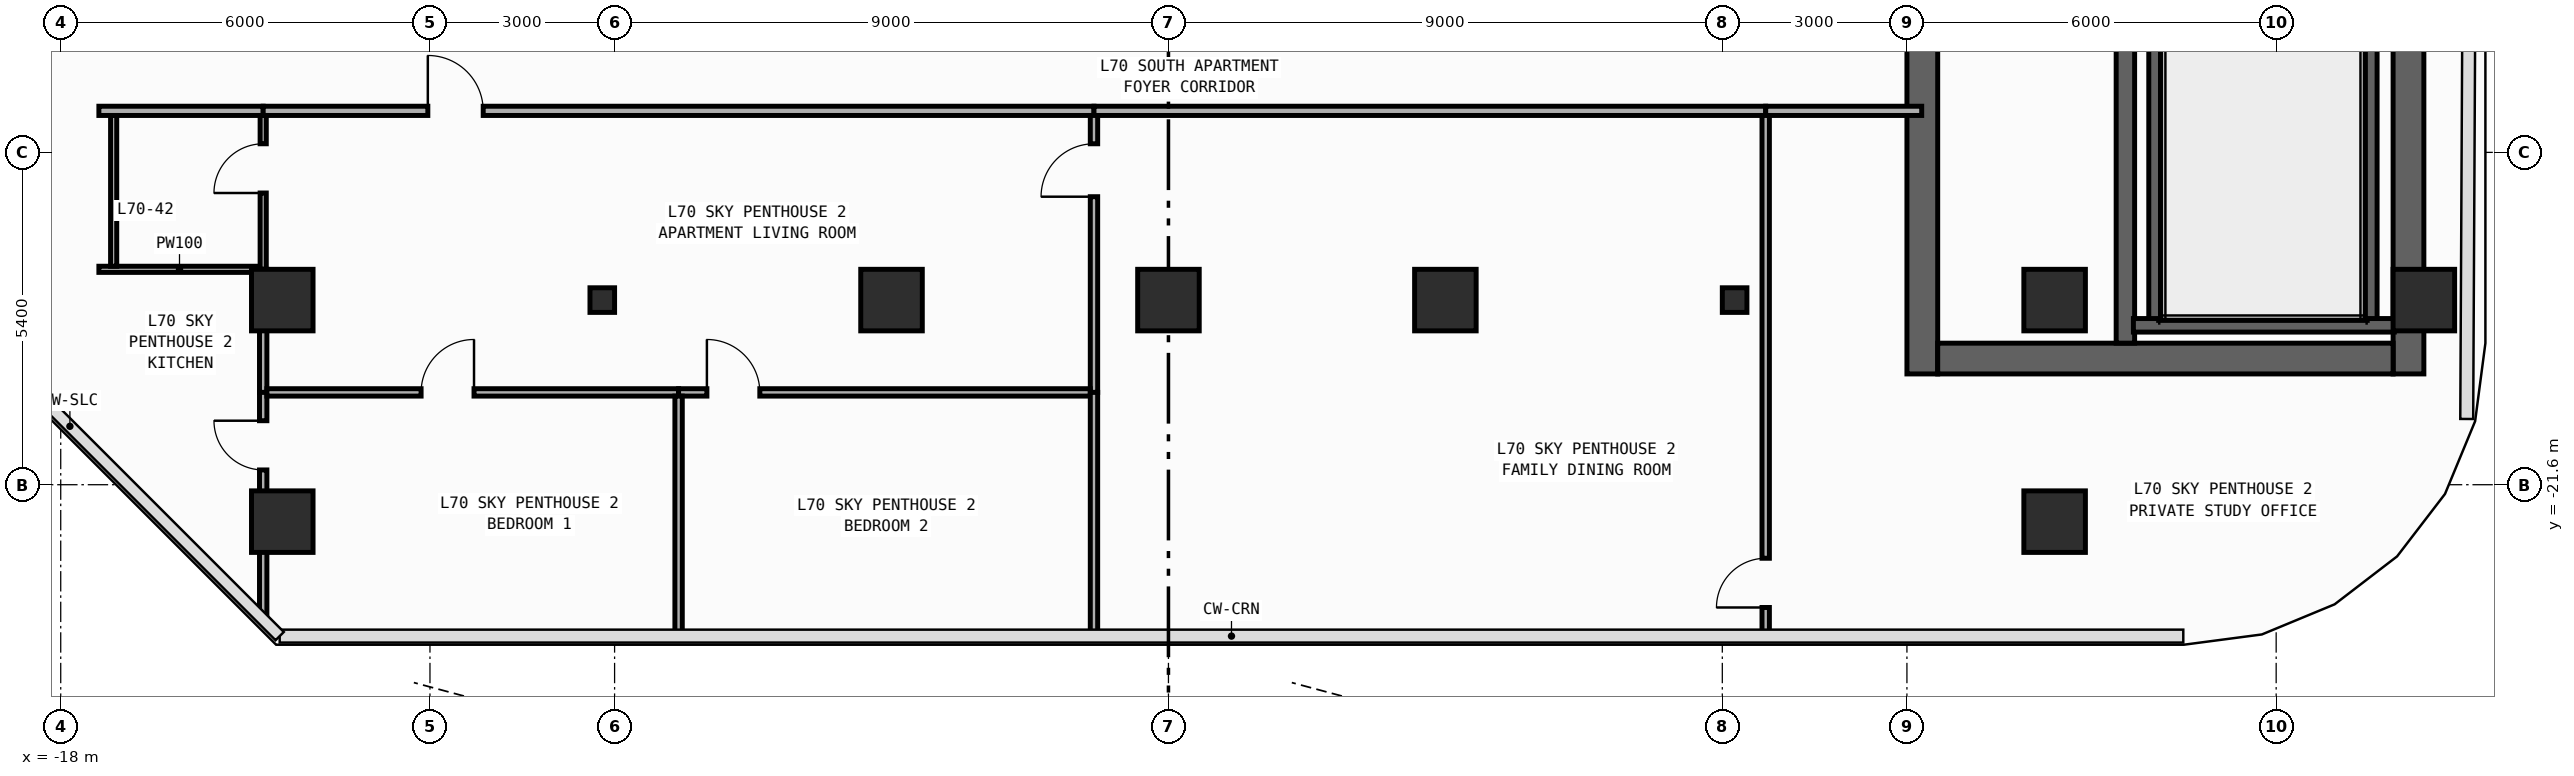
"""IFC4 building model, lengths in metres.
Left out: names, types, materials, properties, quantities, classifications, styles, units other than length and angle.
Written with IfcOpenShell. Run it as: python <this file> out.ifc"""

import sys

from ifc_helpers import new_model, si_unit, direction, frame, frame_2d, origin, origin_2d, place, context, subcontext, project, spatial, rectangle, circle, i_section, extrude, element, fill, save


model = new_model("IFC4")
c1 = context("Model", 3, precision=1e-05, world=origin(), true_north=direction((0.0, 1.0)))
c2 = subcontext(c1, "Body", "Model", "MODEL_VIEW")
j1 = project(units=[si_unit("LENGTHUNIT", "METRE"), si_unit("PLANEANGLEUNIT", "RADIAN")], contexts=[c1])
p1 = place(None, origin())
s1 = spatial("IfcSite", under=j1, at=p1, CompositionType="ELEMENT")
p2 = place(p1, origin())
s2 = spatial("IfcBuilding", under=s1, at=p2, CompositionType="ELEMENT")
p3 = place(p2, frame((0.0, 0.0, 292.8)))
s3 = spatial("IfcBuildingStorey", under=s2, at=p3, CompositionType="ELEMENT", Elevation=292.8)
p4 = place(p3, frame((12.25, -19.8, 0.0), z_axis=(0.0, 0.0, 1.0), x_axis=(0.0, 1.0, 0.0)))
e1 = element("IfcWall", 1, at=p4, inside=s3, PredefinedType="SHEAR", context=c2, shape_type="SweptSolid", body=[
    extrude(rectangle(XDim=27.0, YDim=0.5, at=frame_2d((13.5, 0.0))), origin(), (0.0, 0.0, 1.0), 3.54),
])
p5 = place(p4, frame((23.05, 0.0, 0.0)))
e2 = element("IfcOpeningElement", 2, at=p5, cuts=e1, PredefinedType="OPENING", context=c2, shape_type="SweptSolid", body=[
    extrude(rectangle(XDim=1.1, YDim=2.2, at=frame_2d((0.55, 1.1))), frame((0.0, 0.26, 0.0), z_axis=(0.0, -1.0, 0.0), x_axis=(1.0, 0.0, 0.0)), (0.0, 0.0, 1.0), 0.52),
])
p6 = place(p4, frame((19.85, 0.0, 0.0)))
e3 = element("IfcOpeningElement", 3, at=p6, cuts=e1, PredefinedType="OPENING", context=c2, shape_type="SweptSolid", body=[
    extrude(rectangle(XDim=1.1, YDim=2.2, at=frame_2d((0.55, 1.1))), frame((0.0, 0.26, 0.0), z_axis=(0.0, -1.0, 0.0), x_axis=(1.0, 0.0, 0.0)), (0.0, 0.0, 1.0), 0.52),
])
p7 = place(p4, frame((16.65, 0.0, 0.0)))
e4 = element("IfcOpeningElement", 4, at=p7, cuts=e1, PredefinedType="OPENING", context=c2, shape_type="SweptSolid", body=[
    extrude(rectangle(XDim=1.1, YDim=2.2, at=frame_2d((0.55, 1.1))), frame((0.0, 0.26, 0.0), z_axis=(0.0, -1.0, 0.0), x_axis=(1.0, 0.0, 0.0)), (0.0, 0.0, 1.0), 0.52),
])
p8 = place(p4, frame((6.275, 0.0, 0.0)))
e5 = element("IfcOpeningElement", 5, at=p8, cuts=e1, PredefinedType="OPENING", context=c2, shape_type="SweptSolid", body=[
    extrude(rectangle(XDim=0.85, YDim=2.1, at=frame_2d((0.425, 1.05))), frame((0.0, 0.26, 0.0), z_axis=(0.0, -1.0, 0.0), x_axis=(1.0, 0.0, 0.0)), (0.0, 0.0, 1.0), 0.52),
])
p9 = place(p4, frame((8.575, 0.0, 0.0)))
e6 = element("IfcOpeningElement", 6, at=p9, cuts=e1, PredefinedType="OPENING", context=c2, shape_type="SweptSolid", body=[
    extrude(rectangle(XDim=0.85, YDim=2.1, at=frame_2d((0.425, 1.05))), frame((0.0, 0.26, 0.0), z_axis=(0.0, -1.0, 0.0), x_axis=(1.0, 0.0, 0.0)), (0.0, 0.0, 1.0), 0.52),
])
p10 = place(p4, frame((10.675, 0.0, 0.0)))
e7 = element("IfcOpeningElement", 7, at=p10, cuts=e1, PredefinedType="OPENING", context=c2, shape_type="SweptSolid", body=[
    extrude(rectangle(XDim=0.85, YDim=2.1, at=frame_2d((0.425, 1.05))), frame((0.0, 0.26, 0.0), z_axis=(0.0, -1.0, 0.0), x_axis=(1.0, 0.0, 0.0)), (0.0, 0.0, 1.0), 0.52),
])
p11 = place(p4, frame((12.725, 0.0, 0.0)))
e8 = element("IfcOpeningElement", 8, at=p11, cuts=e1, PredefinedType="OPENING", context=c2, shape_type="SweptSolid", body=[
    extrude(rectangle(XDim=1.15, YDim=2.2, at=frame_2d((0.575, 1.1))), frame((0.0, 0.26, 0.0), z_axis=(0.0, -1.0, 0.0), x_axis=(1.0, 0.0, 0.0)), (0.0, 0.0, 1.0), 0.52),
])
p12 = place(p4, frame((25.125, 0.0, 0.0)))
e9 = element("IfcOpeningElement", 9, at=p12, cuts=e1, PredefinedType="OPENING", context=c2, shape_type="SweptSolid", body=[
    extrude(rectangle(XDim=0.85, YDim=2.1, at=frame_2d((0.425, 1.05))), frame((0.0, 0.26, 0.0), z_axis=(0.0, -1.0, 0.0), x_axis=(1.0, 0.0, 0.0)), (0.0, 0.0, 1.0), 0.52),
])
p13 = place(p3, frame((20.15, -19.8, 0.0), z_axis=(0.0, 0.0, 1.0), x_axis=(0.0, 1.0, 0.0)))
e10 = element("IfcWall", 10, at=p13, inside=s3, PredefinedType="SHEAR", context=c2, shape_type="SweptSolid", body=[
    extrude(rectangle(XDim=27.0, YDim=0.5, at=frame_2d((13.5, 0.0))), origin(), (0.0, 0.0, 1.0), 3.54),
])
p14 = place(p3, frame((12.5, -19.55, 0.0), z_axis=(0.0, 0.0, 1.0), x_axis=(1.0, 0.0, 0.0)))
e11 = element("IfcWall", 11, at=p14, inside=s3, PredefinedType="SHEAR", context=c2, shape_type="SweptSolid", body=[
    extrude(rectangle(XDim=7.4, YDim=0.5, at=frame_2d((3.7, 0.0))), origin(), (0.0, 0.0, 1.0), 3.54),
])
p15 = place(p3, frame((15.55, -19.3, 0.0), z_axis=(0.0, 0.0, 1.0), x_axis=(0.0, 1.0, 0.0)))
e12 = element("IfcWall", 12, at=p15, inside=s3, PredefinedType="SHEAR", context=c2, shape_type="SweptSolid", body=[
    extrude(rectangle(XDim=26.0, YDim=0.3, at=frame_2d((13.0, 0.0))), origin(), (0.0, 0.0, 1.0), 3.54),
])
p16 = place(p15, frame((12.225, 0.0, 0.0)))
e13 = element("IfcOpeningElement", 13, at=p16, cuts=e12, PredefinedType="OPENING", context=c2, shape_type="SweptSolid", body=[
    extrude(rectangle(XDim=1.15, YDim=2.2, at=frame_2d((0.575, 1.1))), frame((0.0, 0.16, 0.0), z_axis=(0.0, -1.0, 0.0), x_axis=(1.0, 0.0, 0.0)), (0.0, 0.0, 1.0), 0.32),
])
p17 = place(p15, frame((24.625, 0.0, 0.0)))
e14 = element("IfcOpeningElement", 14, at=p17, cuts=e12, PredefinedType="OPENING", context=c2, shape_type="SweptSolid", body=[
    extrude(rectangle(XDim=0.85, YDim=2.1, at=frame_2d((0.425, 1.05))), frame((0.0, 0.16, 0.0), z_axis=(0.0, -1.0, 0.0), x_axis=(1.0, 0.0, 0.0)), (0.0, 0.0, 1.0), 0.32),
])
for number, where, z_axis, x_axis in (
    (15, (16.04, -19.01, 0.0), (0.0, 0.0, 1.0), (0.0, 1.0, 0.0)),
    (16, (19.53, -19.01, 0.0), (0.0, 0.0, 1.0), (0.0, 1.0, 0.0)),
):
    element("IfcWall", number, at=place(p3, frame(where, z_axis=z_axis, x_axis=x_axis)), inside=s3, PredefinedType="SHEAR", context=c2, shape_type="SweptSolid", body=[
        extrude(rectangle(XDim=11.42, YDim=0.22, at=frame_2d((5.71, 0.0))), origin(), (0.0, 0.0, 1.0), 3.54),
    ])
p18 = place(p3, frame((15.68, -19.01, 0.0), z_axis=(0.0, 0.0, 1.0), x_axis=(1.0, 0.0, 0.0)))
e17 = element("IfcWall", 17, at=p18, inside=s3, PredefinedType="SHEAR", context=c2, shape_type="SweptSolid", body=[
    extrude(rectangle(XDim=4.24, YDim=0.22, at=frame_2d((2.12, 0.0))), origin(), (0.0, 0.0, 1.0), 3.54),
])
for number, where, z_axis, x_axis in (
    (18, (-9.2, -18.6, 0.0), (0.0, 0.0, 1.0), (1.0, 0.0, 0.0)),
    (19, (9.2, -18.6, 0.0), (0.0, 0.0, 1.0), (1.0, 0.0, 0.0)),
):
    element("IfcColumn", number, at=place(p3, frame(where, z_axis=z_axis, x_axis=x_axis)), inside=s3, PredefinedType="COLUMN", context=c2, shape_type="SweptSolid", body=[
        extrude(i_section(OverallWidth=0.4, OverallDepth=0.4, WebThickness=0.013, FlangeThickness=0.021, FilletRadius=0.022, at=origin_2d()), origin(), (0.0, 0.0, 1.0), 3.8),
    ])
for number, where, z_axis, x_axis in (
    (20, (20.4, -18.6, 0.0), (0.0, 0.0, 1.0), (1.0, 0.0, 0.0)),
    (21, (-14.4, -18.6, 0.0), (0.0, 0.0, 1.0), (1.0, 0.0, 0.0)),
    (22, (14.4, -18.6, 0.0), (0.0, 0.0, 1.0), (1.0, 0.0, 0.0)),
    (23, (-4.5, -18.6, 0.0), (0.0, 0.0, 1.0), (1.0, 0.0, 0.0)),
    (24, (0.0, -18.6, 0.0), (0.0, 0.0, 1.0), (1.0, 0.0, 0.0)),
    (25, (4.5, -18.6, 0.0), (0.0, 0.0, 1.0), (1.0, 0.0, 0.0)),
    (26, (-14.4, -22.2, 0.0), (0.0, 0.0, 1.0), (1.0, 0.0, 0.0)),
    (27, (14.4, -22.2, 0.0), (0.0, 0.0, 1.0), (1.0, 0.0, 0.0)),
):
    element("IfcColumn", number, at=place(p3, frame(where, z_axis=z_axis, x_axis=x_axis)), inside=s3, PredefinedType="COLUMN", context=c2, shape_type="SweptSolid", body=[
        extrude(circle(Radius=0.5, at=origin_2d()), origin(), (0.0, 0.0, 1.0), 3.8),
    ])
p19 = place(p3, frame((-17.38, -15.525, 0.0), z_axis=(0.0, 0.0, 1.0), x_axis=(1.0, 0.0, 0.0)))
e28 = element("IfcWall", 28, at=p19, inside=s3, PredefinedType="PARTITIONING", context=c2, shape_type="SweptSolid", body=[
    extrude(rectangle(XDim=2.67, YDim=0.15, at=frame_2d((1.335, 0.0))), origin(), (0.0, 0.0, 1.0), 3.54),
])
p20 = place(p3, frame((-14.71, -15.525, 0.0), z_axis=(0.0, 0.0, 1.0), x_axis=(1.0, 0.0, 0.0)))
e29 = element("IfcWall", 29, at=p20, inside=s3, PredefinedType="PARTITIONING", context=c2, shape_type="SweptSolid", body=[
    extrude(rectangle(XDim=13.5, YDim=0.15, at=frame_2d((6.75, 0.0))), origin(), (0.0, 0.0, 1.0), 3.54),
])
p21 = place(p20, frame((2.675, 0.0, 0.0)))
e30 = element("IfcOpeningElement", 30, at=p21, cuts=e29, PredefinedType="OPENING", context=c2, shape_type="SweptSolid", body=[
    extrude(rectangle(XDim=0.9, YDim=2.15, at=frame_2d((0.45, 1.075))), frame((0.0, 0.085, 0.0), z_axis=(0.0, -1.0, 0.0), x_axis=(1.0, 0.0, 0.0)), (0.0, 0.0, 1.0), 0.17),
])
p22 = place(p3, frame((-1.21, -15.525, 0.0), z_axis=(0.0, 0.0, 1.0), x_axis=(1.0, 0.0, 0.0)))
e31 = element("IfcWall", 31, at=p22, inside=s3, PredefinedType="PARTITIONING", context=c2, shape_type="SweptSolid", body=[
    extrude(rectangle(XDim=10.915, YDim=0.15, at=frame_2d((5.458, 0.0))), origin(), (0.0, 0.0, 1.0), 3.54),
])
p23 = place(p3, frame((9.705, -15.525, 0.0), z_axis=(0.0, 0.0, 1.0), x_axis=(1.0, 0.0, 0.0)))
e32 = element("IfcWall", 32, at=p23, inside=s3, PredefinedType="PARTITIONING", context=c2, shape_type="SweptSolid", body=[
    extrude(rectangle(XDim=2.535, YDim=0.15, at=frame_2d((1.268, 0.0))), origin(), (0.0, 0.0, 1.0), 3.54),
])
p24 = place(p3, frame((-17.38, -18.1, 0.0), z_axis=(0.0, 0.0, 1.0), x_axis=(1.0, 0.0, 0.0)))
e33 = element("IfcWall", 33, at=p24, inside=s3, PredefinedType="PARTITIONING", context=c2, shape_type="SweptSolid", body=[
    extrude(rectangle(XDim=2.62, YDim=0.1, at=frame_2d((1.31, 0.0))), origin(), (0.0, 0.0, 1.0), 3.54),
])
p25 = place(p3, frame((-14.71, -18.1, 0.0), z_axis=(0.0, 0.0, 1.0), x_axis=(0.0, 1.0, 0.0)))
e34 = element("IfcWall", 34, at=p25, inside=s3, PredefinedType="PARTITIONING", context=c2, shape_type="SweptSolid", body=[
    extrude(rectangle(XDim=2.5, YDim=0.1, at=frame_2d((1.25, 0.0))), origin(), (0.0, 0.0, 1.0), 2.64),
])
p26 = place(p25, frame((1.24, 0.0, 0.0)))
e35 = element("IfcOpeningElement", 35, at=p26, cuts=e34, PredefinedType="OPENING", context=c2, shape_type="SweptSolid", body=[
    extrude(rectangle(XDim=0.8, YDim=2.1, at=frame_2d((0.4, 1.05))), frame((0.0, 0.06, 0.0), z_axis=(0.0, -1.0, 0.0), x_axis=(1.0, 0.0, 0.0)), (0.0, 0.0, 1.0), 0.12),
])
p27 = place(p3, frame((-14.71, -20.1, 0.0), z_axis=(0.0, 0.0, 1.0), x_axis=(0.0, 1.0, 0.0)))
e36 = element("IfcWall", 36, at=p27, inside=s3, PredefinedType="PARTITIONING", context=c2, shape_type="SweptSolid", body=[
    extrude(rectangle(XDim=2.0, YDim=0.12, at=frame_2d((1.0, 0.0))), origin(), (0.0, 0.0, 1.0), 2.64),
])
p28 = place(p3, frame((-14.71, -23.787, 0.0), z_axis=(0.0, 0.0, 1.0), x_axis=(0.0, 1.0, 0.0)))
e37 = element("IfcWall", 37, at=p28, inside=s3, PredefinedType="PARTITIONING", context=c2, shape_type="SweptSolid", body=[
    extrude(rectangle(XDim=3.687, YDim=0.12, at=frame_2d((1.844, 0.0))), origin(), (0.0, 0.0, 1.0), 2.64),
])
p29 = place(p28, frame((2.427, 0.0, 0.0)))
e38 = element("IfcOpeningElement", 38, at=p29, cuts=e37, PredefinedType="OPENING", context=c2, shape_type="SweptSolid", body=[
    extrude(rectangle(XDim=0.8, YDim=2.1, at=frame_2d((0.4, 1.05))), frame((0.0, 0.07, 0.0), z_axis=(0.0, -1.0, 0.0), x_axis=(1.0, 0.0, 0.0)), (0.0, 0.0, 1.0), 0.14),
])
p30 = place(p3, frame((-1.21, -20.1, 0.0), z_axis=(0.0, 0.0, 1.0), x_axis=(0.0, 1.0, 0.0)))
e39 = element("IfcWall", 39, at=p30, inside=s3, PredefinedType="PARTITIONING", context=c2, shape_type="SweptSolid", body=[
    extrude(rectangle(XDim=4.5, YDim=0.12, at=frame_2d((2.25, 0.0))), origin(), (0.0, 0.0, 1.0), 3.54),
])
p31 = place(p30, frame((3.18, 0.0, 0.0)))
e40 = element("IfcOpeningElement", 40, at=p31, cuts=e39, PredefinedType="OPENING", context=c2, shape_type="SweptSolid", body=[
    extrude(rectangle(XDim=0.86, YDim=2.15, at=frame_2d((0.43, 1.075))), frame((0.0, 0.07, 0.0), z_axis=(0.0, -1.0, 0.0), x_axis=(1.0, 0.0, 0.0)), (0.0, 0.0, 1.0), 0.14),
])
p32 = place(p3, frame((-14.65, -20.1, 0.0), z_axis=(0.0, 0.0, 1.0), x_axis=(1.0, 0.0, 0.0)))
e41 = element("IfcWall", 41, at=p32, inside=s3, PredefinedType="PARTITIONING", context=c2, shape_type="SweptSolid", body=[
    extrude(rectangle(XDim=6.69, YDim=0.12, at=frame_2d((3.345, 0.0))), origin(), (0.0, 0.0, 1.0), 3.54),
])
p33 = place(p32, frame((2.506, 0.0, 0.0)))
e42 = element("IfcOpeningElement", 42, at=p33, cuts=e41, PredefinedType="OPENING", context=c2, shape_type="SweptSolid", body=[
    extrude(rectangle(XDim=0.86, YDim=2.15, at=frame_2d((0.43, 1.075))), frame((0.0, 0.07, 0.0), z_axis=(0.0, -1.0, 0.0), x_axis=(1.0, 0.0, 0.0)), (0.0, 0.0, 1.0), 0.14),
])
p34 = place(p3, frame((-7.96, -20.1, 0.0), z_axis=(0.0, 0.0, 1.0), x_axis=(1.0, 0.0, 0.0)))
e43 = element("IfcWall", 43, at=p34, inside=s3, PredefinedType="PARTITIONING", context=c2, shape_type="SweptSolid", body=[
    extrude(rectangle(XDim=6.69, YDim=0.12, at=frame_2d((3.345, 0.0))), origin(), (0.0, 0.0, 1.0), 3.54),
])
p35 = place(p34, frame((0.46, 0.0, 0.0)))
e44 = element("IfcOpeningElement", 44, at=p35, cuts=e43, PredefinedType="OPENING", context=c2, shape_type="SweptSolid", body=[
    extrude(rectangle(XDim=0.86, YDim=2.15, at=frame_2d((0.43, 1.075))), frame((0.0, 0.07, 0.0), z_axis=(0.0, -1.0, 0.0), x_axis=(1.0, 0.0, 0.0)), (0.0, 0.0, 1.0), 0.14),
])
p36 = place(p3, frame((9.705, -24.055, 0.0), z_axis=(0.0, 0.0, 1.0), x_axis=(0.0, 1.0, 0.0)))
e45 = element("IfcWall", 45, at=p36, inside=s3, PredefinedType="PARTITIONING", context=c2, shape_type="SweptSolid", body=[
    extrude(rectangle(XDim=8.455, YDim=0.12, at=frame_2d((4.228, 0.0))), origin(), (0.0, 0.0, 1.0), 3.54),
])
p37 = place(p36, frame((0.46, 0.0, 0.0)))
e46 = element("IfcOpeningElement", 46, at=p37, cuts=e45, PredefinedType="OPENING", context=c2, shape_type="SweptSolid", body=[
    extrude(rectangle(XDim=0.8, YDim=2.1, at=frame_2d((0.4, 1.05))), frame((0.0, 0.07, 0.0), z_axis=(0.0, -1.0, 0.0), x_axis=(1.0, 0.0, 0.0)), (0.0, 0.0, 1.0), 0.14),
])
p38 = place(p3, frame((-1.21, -24.055, 0.0), z_axis=(0.0, 0.0, 1.0), x_axis=(0.0, 1.0, 0.0)))
e47 = element("IfcWall", 47, at=p38, inside=s3, PredefinedType="PARTITIONING", context=c2, shape_type="SweptSolid", body=[
    extrude(rectangle(XDim=3.955, YDim=0.12, at=frame_2d((1.978, 0.0))), origin(), (0.0, 0.0, 1.0), 3.54),
])
p39 = place(p3, frame((-7.96, -24.055, 0.0), z_axis=(0.0, 0.0, 1.0), x_axis=(0.0, 1.0, 0.0)))
e48 = element("IfcWall", 48, at=p39, inside=s3, PredefinedType="PARTITIONING", context=c2, shape_type="SweptSolid", body=[
    extrude(rectangle(XDim=3.895, YDim=0.12, at=frame_2d((1.948, 0.0))), origin(), (0.0, 0.0, 1.0), 3.54),
])
p40 = place(p3, frame((-17.14, -18.05, 0.0), z_axis=(0.0, 0.0, 1.0), x_axis=(0.0, 1.0, 0.0)))
e49 = element("IfcWall", 49, at=p40, inside=s3, PredefinedType="PARTITIONING", context=c2, shape_type="SweptSolid", body=[
    extrude(rectangle(XDim=2.45, YDim=0.1, at=frame_2d((1.225, 0.0))), origin(), (0.0, 0.0, 1.0), 3.54),
])
p41 = place(p21, origin())
e50 = element("IfcDoor", 50, at=p41, inside=s3, OperationType="SINGLE_SWING_LEFT", PredefinedType="DOOR", context=c2, shape_type="SweptSolid", body=[
    extrude(rectangle(XDim=0.9, YDim=2.15, at=frame_2d((0.45, 1.075))), frame((0.0, 0.025, 0.0), z_axis=(0.0, -1.0, 0.0), x_axis=(1.0, 0.0, 0.0)), (0.0, 0.0, 1.0), 0.05),
])
fill(e30, e50)
p42 = place(p26, origin())
e51 = element("IfcDoor", 51, at=p42, inside=s3, OperationType="SINGLE_SWING_LEFT", PredefinedType="DOOR", context=c2, shape_type="SweptSolid", body=[
    extrude(rectangle(XDim=0.8, YDim=2.1, at=frame_2d((0.4, 1.05))), frame((0.0, 0.025, 0.0), z_axis=(0.0, -1.0, 0.0), x_axis=(1.0, 0.0, 0.0)), (0.0, 0.0, 1.0), 0.05),
])
fill(e35, e51)
p43 = place(p31, origin())
e52 = element("IfcDoor", 52, at=p43, inside=s3, OperationType="SINGLE_SWING_LEFT", PredefinedType="DOOR", context=c2, shape_type="SweptSolid", body=[
    extrude(rectangle(XDim=0.86, YDim=2.15, at=frame_2d((0.43, 1.075))), frame((0.0, 0.025, 0.0), z_axis=(0.0, -1.0, 0.0), x_axis=(1.0, 0.0, 0.0)), (0.0, 0.0, 1.0), 0.05),
])
fill(e40, e52)
p44 = place(p33, origin())
e53 = element("IfcDoor", 53, at=p44, inside=s3, OperationType="SINGLE_SWING_RIGHT", PredefinedType="DOOR", context=c2, shape_type="SweptSolid", body=[
    extrude(rectangle(XDim=0.86, YDim=2.15, at=frame_2d((0.43, 1.075))), frame((0.0, 0.025, 0.0), z_axis=(0.0, -1.0, 0.0), x_axis=(1.0, 0.0, 0.0)), (0.0, 0.0, 1.0), 0.05),
])
fill(e42, e53)
p45 = place(p35, origin())
e54 = element("IfcDoor", 54, at=p45, inside=s3, OperationType="SINGLE_SWING_LEFT", PredefinedType="DOOR", context=c2, shape_type="SweptSolid", body=[
    extrude(rectangle(XDim=0.86, YDim=2.15, at=frame_2d((0.43, 1.075))), frame((0.0, 0.025, 0.0), z_axis=(0.0, -1.0, 0.0), x_axis=(1.0, 0.0, 0.0)), (0.0, 0.0, 1.0), 0.05),
])
fill(e44, e54)
p46 = place(p37, origin())
e55 = element("IfcDoor", 55, at=p46, inside=s3, OperationType="SINGLE_SWING_LEFT", PredefinedType="DOOR", context=c2, shape_type="SweptSolid", body=[
    extrude(rectangle(XDim=0.8, YDim=2.1, at=frame_2d((0.4, 1.05))), frame((0.0, 0.025, 0.0), z_axis=(0.0, -1.0, 0.0), x_axis=(1.0, 0.0, 0.0)), (0.0, 0.0, 1.0), 0.05),
])
fill(e46, e55)
p47 = place(p29, origin())
e56 = element("IfcDoor", 56, at=p47, inside=s3, OperationType="SINGLE_SWING_RIGHT", PredefinedType="DOOR", context=c2, shape_type="SweptSolid", body=[
    extrude(rectangle(XDim=0.8, YDim=2.1, at=frame_2d((0.4, 1.05))), frame((0.0, 0.025, 0.0), z_axis=(0.0, -1.0, 0.0), x_axis=(1.0, 0.0, 0.0)), (0.0, 0.0, 1.0), 0.05),
])
fill(e38, e56)
save(model, sys.argv[1])
